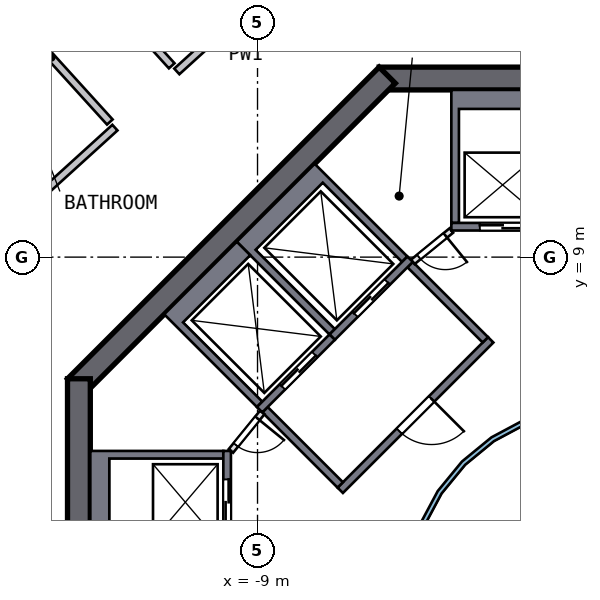
"""IFC4 building model, lengths in metres.
Left out: names, types, materials, properties, quantities, classifications, styles, units other than length and angle.
Written with IfcOpenShell. Run it as: python <this file> out.ifc"""

import sys

from ifc_helpers import new_model, si_unit, direction, frame, frame_2d, origin, place, context, subcontext, project, spatial, polyline, rectangle, outline, extrude, element, fill, save


model = new_model("IFC4")
c1 = context("Model", 3, precision=1e-05, world=origin(), true_north=direction((0.0, 1.0)))
c2 = subcontext(c1, "Body", "Model", "MODEL_VIEW")
j1 = project(units=[si_unit("LENGTHUNIT", "METRE"), si_unit("PLANEANGLEUNIT", "RADIAN")], contexts=[c1])
p1 = place(None, origin())
s1 = spatial("IfcSite", under=j1, at=p1, CompositionType="ELEMENT")
p2 = place(p1, origin())
s2 = spatial("IfcBuilding", under=s1, at=p2, CompositionType="ELEMENT")
p3 = place(p2, frame((0.0, 0.0, 205.5)))
s3 = spatial("IfcBuildingStorey", under=s2, at=p3, CompositionType="ELEMENT", Elevation=205.5)
p4 = place(p3, frame((5.799, 13.7, 0.0), z_axis=(0.0, 0.0, 1.0), x_axis=(-1.0, 0.0, 0.0)))
e1 = element("IfcWall", 1, at=p4, inside=s3, PredefinedType="SHEAR", context=c2, shape_type="SweptSolid", body=[
    extrude(rectangle(XDim=11.598, YDim=0.6, at=frame_2d((5.799, 0.0))), origin(), (0.0, 0.0, 1.0), 3.5),
])
p5 = place(p4, frame((4.899, 0.0, 0.0)))
e2 = element("IfcOpeningElement", 2, at=p5, cuts=e1, PredefinedType="OPENING", context=c2, shape_type="SweptSolid", body=[
    extrude(rectangle(XDim=1.8, YDim=2.1, at=frame_2d((0.9, 1.05))), frame((0.0, 0.31, 0.0), z_axis=(0.0, -1.0, 0.0), x_axis=(1.0, 0.0, 0.0)), (0.0, 0.0, 1.0), 0.62),
])
p6 = place(p3, frame((-5.587, 13.788, 0.0), z_axis=(0.0, 0.0, 1.0), x_axis=(-0.707106781, -0.707106781, 0.0)))
e3 = element("IfcWall", 3, at=p6, inside=s3, PredefinedType="SHEAR", context=c2, shape_type="SweptSolid", body=[
    extrude(rectangle(XDim=11.598, YDim=0.6, at=frame_2d((5.799, 0.0))), origin(), (0.0, 0.0, 1.0), 3.5),
])
p7 = place(p3, frame((-13.7, 5.799, 0.0), z_axis=(0.0, 0.0, 1.0), x_axis=(0.0, -1.0, 0.0)))
e4 = element("IfcWall", 4, at=p7, inside=s3, PredefinedType="SHEAR", context=c2, shape_type="SweptSolid", body=[
    extrude(rectangle(XDim=11.598, YDim=0.6, at=frame_2d((5.799, 0.0))), origin(), (0.0, 0.0, 1.0), 3.5),
])
p8 = place(p7, frame((4.899, 0.0, 0.0)))
e5 = element("IfcOpeningElement", 5, at=p8, cuts=e4, PredefinedType="OPENING", context=c2, shape_type="SweptSolid", body=[
    extrude(rectangle(XDim=1.8, YDim=2.1, at=frame_2d((0.9, 1.05))), frame((0.0, 0.31, 0.0), z_axis=(0.0, -1.0, 0.0), x_axis=(1.0, 0.0, 0.0)), (0.0, 0.0, 1.0), 0.62),
])
p9 = place(p3, origin())
e6 = element("IfcWall", 6, at=p9, inside=s3, PredefinedType="SOLIDWALL", context=c2, shape_type="SweptSolid", body=[
    extrude(outline(polyline([(-3.9, 13.4), (-1.2, 13.4), (-1.2, 9.9), (-1.4, 9.9), (-1.4, 12.9), (-3.7, 12.9), (-3.7, 9.9), (-3.9, 9.9), (-3.9, 13.4)])), origin(), (0.0, 0.0, 1.0), 3.19),
])
p10 = place(p3, frame((-1.2, 9.8, 0.0), z_axis=(0.0, 0.0, 1.0), x_axis=(-1.0, 0.0, 0.0)))
e7 = element("IfcWall", 7, at=p10, inside=s3, PredefinedType="SOLIDWALL", context=c2, shape_type="SweptSolid", body=[
    extrude(rectangle(XDim=2.7, YDim=0.2, at=frame_2d((1.35, 0.0))), origin(), (0.0, 0.0, 1.0), 3.19),
])
p11 = place(p10, frame((0.75, 0.0, 0.0)))
e8 = element("IfcOpeningElement", 8, at=p11, cuts=e7, PredefinedType="OPENING", context=c2, shape_type="SweptSolid", body=[
    extrude(rectangle(XDim=1.2, YDim=2.1, at=frame_2d((0.6, 1.05))), frame((0.0, 0.11, 0.0), z_axis=(0.0, -1.0, 0.0), x_axis=(1.0, 0.0, 0.0)), (0.0, 0.0, 1.0), 0.22),
])
p12 = place(p3, origin())
e9 = element("IfcWall", 9, at=p12, inside=s3, PredefinedType="SOLIDWALL", context=c2, shape_type="SweptSolid", body=[
    extrude(outline(polyline([(-13.4, 3.9), (-9.9, 3.9), (-9.9, 3.7), (-12.9, 3.7), (-12.9, 1.4), (-9.9, 1.4), (-9.9, 1.2), (-13.4, 1.2), (-13.4, 3.9)])), origin(), (0.0, 0.0, 1.0), 3.19),
])
p13 = place(p3, frame((-9.8, 1.2, 0.0), z_axis=(0.0, 0.0, 1.0), x_axis=(0.0, 1.0, 0.0)))
e10 = element("IfcWall", 10, at=p13, inside=s3, PredefinedType="SOLIDWALL", context=c2, shape_type="SweptSolid", body=[
    extrude(rectangle(XDim=2.7, YDim=0.2, at=frame_2d((1.35, 0.0))), origin(), (0.0, 0.0, 1.0), 3.19),
])
p14 = place(p13, frame((0.75, 0.0, 0.0)))
e11 = element("IfcOpeningElement", 11, at=p14, cuts=e10, PredefinedType="OPENING", context=c2, shape_type="SweptSolid", body=[
    extrude(rectangle(XDim=1.2, YDim=2.1, at=frame_2d((0.6, 1.05))), frame((0.0, 0.11, 0.0), z_axis=(0.0, -1.0, 0.0), x_axis=(1.0, 0.0, 0.0)), (0.0, 0.0, 1.0), 0.22),
])
p15 = place(p3, origin())
e12 = element("IfcWall", 12, at=p15, inside=s3, PredefinedType="SOLIDWALL", context=c2, shape_type="SweptSolid", body=[
    extrude(outline(polyline([(-9.546, 9.405), (-7.495, 11.455), (-5.056, 9.016), (-5.197, 8.874), (-7.283, 10.96), (-9.051, 9.192), (-6.965, 7.106), (-7.106, 6.965), (-9.546, 9.405)])), origin(), (0.0, 0.0, 1.0), 3.19),
])
p16 = place(p3, frame((-4.985, 8.945, 0.0), z_axis=(0.0, 0.0, 1.0), x_axis=(-0.707106781, -0.707106781, 0.0)))
e13 = element("IfcWall", 13, at=p16, inside=s3, PredefinedType="SOLIDWALL", context=c2, shape_type="SweptSolid", body=[
    extrude(rectangle(XDim=2.9, YDim=0.2, at=frame_2d((1.45, 0.0))), origin(), (0.0, 0.0, 1.0), 3.19),
])
p17 = place(p16, frame((0.85, 0.0, 0.0)))
e14 = element("IfcOpeningElement", 14, at=p17, cuts=e13, PredefinedType="OPENING", context=c2, shape_type="SweptSolid", body=[
    extrude(rectangle(XDim=1.2, YDim=2.1, at=frame_2d((0.6, 1.05))), frame((0.0, 0.11, 0.0), z_axis=(0.0, -1.0, 0.0), x_axis=(1.0, 0.0, 0.0)), (0.0, 0.0, 1.0), 0.22),
])
p18 = place(p3, origin())
e15 = element("IfcWall", 15, at=p18, inside=s3, PredefinedType="SOLIDWALL", context=c2, shape_type="SweptSolid", body=[
    extrude(outline(polyline([(-11.455, 7.495), (-9.546, 9.405), (-9.192, 9.051), (-10.96, 7.283), (-8.874, 5.197), (-9.016, 5.056), (-11.455, 7.495)])), origin(), (0.0, 0.0, 1.0), 3.19),
])
p19 = place(p3, frame((-7.036, 6.894, 0.0), z_axis=(0.0, 0.0, 1.0), x_axis=(-0.707106781, -0.707106781, 0.0)))
e16 = element("IfcWall", 16, at=p19, inside=s3, PredefinedType="SOLIDWALL", context=c2, shape_type="SweptSolid", body=[
    extrude(rectangle(XDim=2.7, YDim=0.2, at=frame_2d((1.35, 0.0))), origin(), (0.0, 0.0, 1.0), 3.19),
])
p20 = place(p19, frame((0.65, 0.0, 0.0)))
e17 = element("IfcOpeningElement", 17, at=p20, cuts=e16, PredefinedType="OPENING", context=c2, shape_type="SweptSolid", body=[
    extrude(rectangle(XDim=1.2, YDim=2.1, at=frame_2d((0.6, 1.05))), frame((0.0, 0.11, 0.0), z_axis=(0.0, -1.0, 0.0), x_axis=(1.0, 0.0, 0.0)), (0.0, 0.0, 1.0), 0.22),
])
p21 = place(p3, frame((-2.864, 6.823, 0.0), z_axis=(0.0, 0.0, 1.0), x_axis=(-0.707106781, -0.707106781, 0.0)))
e18 = element("IfcWall", 18, at=p21, inside=s3, PredefinedType="SOLIDWALL", context=c2, shape_type="SweptSolid", body=[
    extrude(rectangle(XDim=5.6, YDim=0.2, at=frame_2d((2.8, 0.0))), origin(), (0.0, 0.0, 1.0), 3.19),
])
p22 = place(p21, frame((2.2, 0.0, 0.0)))
e19 = element("IfcOpeningElement", 19, at=p22, cuts=e18, PredefinedType="OPENING", context=c2, shape_type="SweptSolid", body=[
    extrude(rectangle(XDim=1.2, YDim=2.1, at=frame_2d((0.6, 1.05))), frame((0.0, 0.11, 0.0), z_axis=(0.0, -1.0, 0.0), x_axis=(1.0, 0.0, 0.0)), (0.0, 0.0, 1.0), 0.22),
])
for number, where, z_axis, x_axis in (
    (20, (-3.005, 6.823, 0.0), (0.0, 0.0, 1.0), (-0.707, 0.707, 0.0)),
    (21, (-6.823, 3.005, 0.0), (0.0, 0.0, 1.0), (-0.707, 0.707, 0.0)),
):
    element("IfcWall", number, at=place(p3, frame(where, z_axis=z_axis, x_axis=x_axis)), inside=s3, PredefinedType="SOLIDWALL", context=c2, shape_type="SweptSolid", body=[
        extrude(rectangle(XDim=2.8, YDim=0.2, at=frame_2d((1.4, 0.0))), origin(), (0.0, 0.0, 1.0), 3.19),
    ])
p23 = place(p3, frame((-3.9, 9.7, 0.0), z_axis=(0.0, 0.0, 1.0), x_axis=(-0.775559878, -0.631274009, 0.0)))
e22 = element("IfcWall", 22, at=p23, inside=s3, PredefinedType="PARTITIONING", context=c2, shape_type="SweptSolid", body=[
    extrude(rectangle(XDim=1.308, YDim=0.15, at=frame_2d((0.654, 0.0))), origin(), (0.0, 0.0, 1.0), 3.19),
])
p24 = place(p23, frame((0.204, 0.0, 0.0)))
e23 = element("IfcOpeningElement", 23, at=p24, cuts=e22, PredefinedType="OPENING", context=c2, shape_type="SweptSolid", body=[
    extrude(rectangle(XDim=0.9, YDim=2.1, at=frame_2d((0.45, 1.05))), frame((0.0, 0.085, 0.0), z_axis=(0.0, -1.0, 0.0), x_axis=(1.0, 0.0, 0.0)), (0.0, 0.0, 1.0), 0.17),
])
p25 = place(p3, frame((-8.874, 4.914, 0.0), z_axis=(0.0, 0.0, 1.0), x_axis=(-0.631274009, -0.775559878, 0.0)))
e24 = element("IfcWall", 24, at=p25, inside=s3, PredefinedType="PARTITIONING", context=c2, shape_type="SweptSolid", body=[
    extrude(rectangle(XDim=1.308, YDim=0.15, at=frame_2d((0.654, 0.0))), origin(), (0.0, 0.0, 1.0), 3.19),
])
p26 = place(p25, frame((0.204, 0.0, 0.0)))
e25 = element("IfcOpeningElement", 25, at=p26, cuts=e24, PredefinedType="OPENING", context=c2, shape_type="SweptSolid", body=[
    extrude(rectangle(XDim=0.9, YDim=2.1, at=frame_2d((0.45, 1.05))), frame((0.0, 0.085, 0.0), z_axis=(0.0, -1.0, 0.0), x_axis=(1.0, 0.0, 0.0)), (0.0, 0.0, 1.0), 0.17),
])
p27 = place(p3, origin())
e26 = element("IfcWall", 26, at=p27, inside=s3, PredefinedType="SOLIDWALL", context=c2, shape_type="SweptSolid", body=[
    extrude(outline(polyline([(5.021, -0.999), (4.73, -1.959), (4.257, -2.844), (3.62, -3.62), (2.844, -4.257), (1.959, -4.73), (0.999, -5.021), (0.0, -5.12), (-0.999, -5.021), (-1.959, -4.73), (-2.844, -4.257), (-3.62, -3.62), (-4.257, -2.844), (-4.73, -1.959), (-5.021, -0.999), (-5.12, 0.0), (-5.021, 0.999), (-4.73, 1.959), (-4.257, 2.844), (-3.62, 3.62), (-2.844, 4.257), (-1.959, 4.73), (-0.999, 5.021), (0.0, 5.12), (0.999, 5.021), (1.959, 4.73), (2.844, 4.257), (3.62, 3.62), (4.257, 2.844), (4.73, 1.959), (5.021, 0.999), (5.12, 0.0), (5.021, -0.999)]), holes=[polyline([(4.904, 0.976), (4.619, 1.913), (4.157, 2.778), (3.535, 3.535), (2.778, 4.157), (1.913, 4.619), (0.976, 4.904), (0.0, 5.0), (-0.976, 4.904), (-1.913, 4.619), (-2.778, 4.157), (-3.535, 3.535), (-4.157, 2.778), (-4.619, 1.913), (-4.904, 0.976), (-5.0, 0.0), (-4.904, -0.976), (-4.619, -1.913), (-4.157, -2.778), (-3.535, -3.535), (-2.778, -4.157), (-1.913, -4.619), (-0.976, -4.904), (0.0, -5.0), (0.976, -4.904), (1.913, -4.619), (2.778, -4.157), (3.535, -3.535), (4.157, -2.778), (4.619, -1.913), (4.904, -0.976), (5.0, 0.0), (4.904, 0.976)])]), origin(), (0.0, 0.0, 1.0), 3.19),
])
p28 = place(p3, frame((-12.887, 12.556, 0.0), z_axis=(0.0, 0.0, 1.0), x_axis=(-0.672229236, 0.740343066, 0.0)))
e27 = element("IfcWall", 27, at=p28, inside=s3, PredefinedType="SOLIDWALL", context=c2, shape_type="SweptSolid", body=[
    extrude(rectangle(XDim=9.043, YDim=0.2, at=frame_2d((4.521, 0.0))), origin(), (0.0, 0.0, 1.0), 3.19),
])
p29 = place(p28, frame((4.8, 0.0, 0.0)))
e28 = element("IfcOpeningElement", 28, at=p29, cuts=e27, PredefinedType="OPENING", context=c2, shape_type="SweptSolid", body=[
    extrude(rectangle(XDim=1.0, YDim=2.1, at=frame_2d((0.5, 1.05))), frame((0.0, 0.11, 0.0), z_axis=(0.0, -1.0, 0.0), x_axis=(1.0, 0.0, 0.0)), (0.0, 0.0, 1.0), 0.22),
])
p30 = place(p3, frame((-17.337, 20.73, 0.0), z_axis=(0.0, 0.0, 1.0), x_axis=(0.672244033, -0.74032963, 0.0)))
e29 = element("IfcWall", 29, at=p30, inside=s3, PredefinedType="SOLIDWALL", context=c2, shape_type="SweptSolid", body=[
    extrude(rectangle(XDim=9.043, YDim=0.2, at=frame_2d((4.522, 0.0))), origin(), (0.0, 0.0, 1.0), 3.19),
])
p31 = place(p30, frame((3.2, 0.0, 0.0)))
e30 = element("IfcOpeningElement", 30, at=p31, cuts=e29, PredefinedType="OPENING", context=c2, shape_type="SweptSolid", body=[
    extrude(rectangle(XDim=1.0, YDim=2.1, at=frame_2d((0.5, 1.05))), frame((0.0, 0.11, 0.0), z_axis=(0.0, -1.0, 0.0), x_axis=(1.0, 0.0, 0.0)), (0.0, 0.0, 1.0), 0.22),
])
p32 = place(p3, frame((-12.752, 12.408, 0.0), z_axis=(0.0, 0.0, 1.0), x_axis=(-0.740313689, -0.672261587, 0.0)))
e31 = element("IfcWall", 31, at=p32, inside=s3, PredefinedType="SOLIDWALL", context=c2, shape_type="SweptSolid", body=[
    extrude(rectangle(XDim=3.458, YDim=0.2, at=frame_2d((1.729, 0.0))), origin(), (0.0, 0.0, 1.0), 3.19),
])
p33 = place(p3, frame((-8.415, 16.346, 0.0), z_axis=(0.0, 0.0, 1.0), x_axis=(-0.74032347, -0.672250817, 0.0)))
e32 = element("IfcWall", 32, at=p33, inside=s3, PredefinedType="SOLIDWALL", context=c2, shape_type="SweptSolid", body=[
    extrude(rectangle(XDim=3.658, YDim=0.2, at=frame_2d((1.829, 0.0))), origin(), (0.0, 0.0, 1.0), 3.19),
])
p34 = place(p11, origin())
e33 = element("IfcDoor", 33, at=p34, inside=s3, OperationType="DOUBLE_DOOR_SLIDING", PredefinedType="DOOR", context=c2, shape_type="SweptSolid", body=[
    extrude(rectangle(XDim=1.2, YDim=2.1, at=frame_2d((0.6, 1.05))), frame((0.0, 0.025, 0.0), z_axis=(0.0, -1.0, 0.0), x_axis=(1.0, 0.0, 0.0)), (0.0, 0.0, 1.0), 0.05),
])
fill(e8, e33)
p35 = place(p14, origin())
e34 = element("IfcDoor", 34, at=p35, inside=s3, OperationType="DOUBLE_DOOR_SLIDING", PredefinedType="DOOR", context=c2, shape_type="SweptSolid", body=[
    extrude(rectangle(XDim=1.2, YDim=2.1, at=frame_2d((0.6, 1.05))), frame((0.0, 0.025, 0.0), z_axis=(0.0, -1.0, 0.0), x_axis=(1.0, 0.0, 0.0)), (0.0, 0.0, 1.0), 0.05),
])
fill(e11, e34)
p36 = place(p17, origin())
e35 = element("IfcDoor", 35, at=p36, inside=s3, OperationType="DOUBLE_DOOR_SLIDING", PredefinedType="DOOR", context=c2, shape_type="SweptSolid", body=[
    extrude(rectangle(XDim=1.2, YDim=2.1, at=frame_2d((0.6, 1.05))), frame((0.0, 0.025, 0.0), z_axis=(0.0, -1.0, 0.0), x_axis=(1.0, 0.0, 0.0)), (0.0, 0.0, 1.0), 0.05),
])
fill(e14, e35)
p37 = place(p20, origin())
e36 = element("IfcDoor", 36, at=p37, inside=s3, OperationType="DOUBLE_DOOR_SLIDING", PredefinedType="DOOR", context=c2, shape_type="SweptSolid", body=[
    extrude(rectangle(XDim=1.2, YDim=2.1, at=frame_2d((0.6, 1.05))), frame((0.0, 0.025, 0.0), z_axis=(0.0, -1.0, 0.0), x_axis=(1.0, 0.0, 0.0)), (0.0, 0.0, 1.0), 0.05),
])
fill(e17, e36)
p38 = place(p22, origin())
e37 = element("IfcDoor", 37, at=p38, inside=s3, OperationType="SINGLE_SWING_LEFT", PredefinedType="DOOR", context=c2, shape_type="SweptSolid", body=[
    extrude(rectangle(XDim=1.2, YDim=2.1, at=frame_2d((0.6, 1.05))), frame((0.0, 0.025, 0.0), z_axis=(0.0, -1.0, 0.0), x_axis=(1.0, 0.0, 0.0)), (0.0, 0.0, 1.0), 0.05),
])
fill(e19, e37)
p39 = place(p24, origin())
e38 = element("IfcDoor", 38, at=p39, inside=s3, OperationType="SINGLE_SWING_LEFT", PredefinedType="DOOR", context=c2, shape_type="SweptSolid", body=[
    extrude(rectangle(XDim=0.9, YDim=2.1, at=frame_2d((0.45, 1.05))), frame((0.0, 0.025, 0.0), z_axis=(0.0, -1.0, 0.0), x_axis=(1.0, 0.0, 0.0)), (0.0, 0.0, 1.0), 0.05),
])
fill(e23, e38)
p40 = place(p26, origin())
e39 = element("IfcDoor", 39, at=p40, inside=s3, OperationType="SINGLE_SWING_LEFT", PredefinedType="DOOR", context=c2, shape_type="SweptSolid", body=[
    extrude(rectangle(XDim=0.9, YDim=2.1, at=frame_2d((0.45, 1.05))), frame((0.0, 0.025, 0.0), z_axis=(0.0, -1.0, 0.0), x_axis=(1.0, 0.0, 0.0)), (0.0, 0.0, 1.0), 0.05),
])
fill(e25, e39)
save(model, sys.argv[1])
